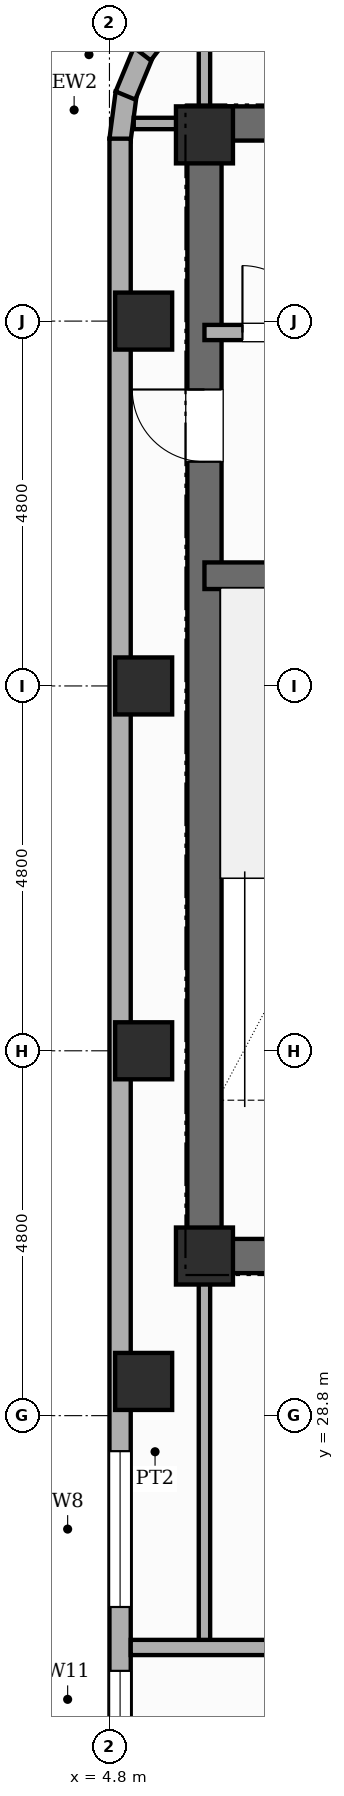
"""IFC4 building model, lengths in metres.
Left out: names, types, materials, properties, quantities, classifications, styles, units other than length and angle.
Written with IfcOpenShell. Run it as: python <this file> out.ifc"""

import sys

from ifc_helpers import new_model, si_unit, direction, frame, frame_2d, origin, origin_2d, place, context, subcontext, project, spatial, rectangle, extrude, element, fill, save


model = new_model("IFC4")
c1 = context("Model", 3, precision=1e-05, world=origin(), true_north=direction((0.0, 1.0)))
c2 = subcontext(c1, "Body", "Model", "MODEL_VIEW")
j1 = project(units=[si_unit("LENGTHUNIT", "METRE"), si_unit("PLANEANGLEUNIT", "RADIAN")], contexts=[c1])
p1 = place(None, origin())
s1 = spatial("IfcSite", under=j1, at=p1, CompositionType="ELEMENT")
p2 = place(p1, origin())
s2 = spatial("IfcBuilding", under=s1, at=p2, CompositionType="ELEMENT")
p3 = place(p2, frame((0.0, 0.0, 278.5)))
s3 = spatial("IfcBuildingStorey", under=s2, at=p3, CompositionType="ELEMENT", Elevation=278.5)
p4 = place(p3, frame((6.05, 30.675, 0.0), z_axis=(0.0, 0.0, 1.0), x_axis=(0.0, 1.0, 0.0)))
e1 = element("IfcWall", 1, at=p4, inside=s3, PredefinedType="SHEAR", context=c2, shape_type="SweptSolid", body=[
    extrude(rectangle(XDim=15.35, YDim=0.45, at=frame_2d((7.675, 0.0))), origin(), (0.0, 0.0, 1.0), 4.3),
])
p5 = place(p4, frame((10.675, 0.0, 0.0)))
e2 = element("IfcOpeningElement", 2, at=p5, cuts=e1, PredefinedType="OPENING", context=c2, shape_type="SweptSolid", body=[
    extrude(rectangle(XDim=0.95, YDim=2.15, at=frame_2d((0.475, 1.075))), frame((0.0, 0.235, 0.0), z_axis=(0.0, -1.0, 0.0), x_axis=(1.0, 0.0, 0.0)), (0.0, 0.0, 1.0), 0.47),
])
p6 = place(p3, frame((6.05, 45.8, 0.0), z_axis=(0.0, 0.0, 1.0), x_axis=(1.0, 0.0, 0.0)))
e3 = element("IfcWall", 3, at=p6, inside=s3, PredefinedType="SHEAR", context=c2, shape_type="SweptSolid", body=[
    extrude(rectangle(XDim=16.7, YDim=0.45, at=frame_2d((8.35, 0.0))), origin(), (0.0, 0.0, 1.0), 4.3),
])
p7 = place(p6, frame((13.57, 0.0, 0.0)))
e4 = element("IfcOpeningElement", 4, at=p7, cuts=e3, PredefinedType="OPENING", context=c2, shape_type="SweptSolid", body=[
    extrude(rectangle(XDim=0.95, YDim=2.15, at=frame_2d((0.475, 1.075))), frame((0.0, 0.235, 0.0), z_axis=(0.0, -1.0, 0.0), x_axis=(1.0, 0.0, 0.0)), (0.0, 0.0, 1.0), 0.47),
])
p8 = place(p3, frame((6.05, 30.9, 0.0), z_axis=(0.0, 0.0, 1.0), x_axis=(1.0, 0.0, 0.0)))
e5 = element("IfcWall", 5, at=p8, inside=s3, PredefinedType="SHEAR", context=c2, shape_type="SweptSolid", body=[
    extrude(rectangle(XDim=3.91, YDim=0.45, at=frame_2d((1.955, 0.0))), origin(), (0.0, 0.0, 1.0), 4.3),
])
p9 = place(p3, frame((6.05, 39.85, 0.0), z_axis=(0.0, 0.0, 1.0), x_axis=(1.0, 0.0, 0.0)))
e6 = element("IfcWall", 6, at=p9, inside=s3, PredefinedType="SHEAR", context=c2, shape_type="SweptSolid", body=[
    extrude(rectangle(XDim=3.91, YDim=0.35, at=frame_2d((1.955, 0.0))), origin(), (0.0, 0.0, 1.0), 4.3),
])
for number, where, z_axis, x_axis in (
    (7, (5.25, 29.25, 0.0), (0.0, 0.0, 1.0), (1.0, 0.0, 0.0)),
    (8, (5.25, 33.6, 0.0), (0.0, 0.0, 1.0), (1.0, 0.0, 0.0)),
    (9, (5.25, 38.4, 0.0), (0.0, 0.0, 1.0), (1.0, 0.0, 0.0)),
    (10, (5.25, 43.2, 0.0), (0.0, 0.0, 1.0), (1.0, 0.0, 0.0)),
    (11, (6.05, 30.9, 0.0), (0.0, 0.0, 1.0), (1.0, 0.0, 0.0)),
    (12, (6.05, 45.65, 0.0), (0.0, 0.0, 1.0), (1.0, 0.0, 0.0)),
):
    element("IfcColumn", number, at=place(p3, frame(where, z_axis=z_axis, x_axis=x_axis)), inside=s3, PredefinedType="COLUMN", context=c2, shape_type="SweptSolid", body=[
        extrude(rectangle(XDim=0.75, YDim=0.75, at=origin_2d()), origin(), (0.0, 0.0, 1.0), 4.3),
    ])
for number, where, z_axis, x_axis in (
    (13, (4.939, 45.582, 0.0), (0.0, 0.0, 1.0), (0.131, 0.991, 0.0)),
    (14, (5.011, 46.167, 0.0), (0.0, 0.0, 1.0), (0.383, 0.924, 0.0)),
    (15, (5.233, 46.715, 0.0), (0.0, 0.0, 1.0), (0.609, 0.793, 0.0)),
):
    element("IfcWall", number, at=place(p3, frame(where, z_axis=z_axis, x_axis=x_axis)), inside=s3, PredefinedType="STANDARD", context=c2, shape_type="SweptSolid", body=[
        extrude(rectangle(XDim=0.626, YDim=0.28, at=frame_2d((0.313, 0.0))), origin(), (0.0, 0.0, 1.0), 4.04),
    ])
p10 = place(p3, frame((4.94, 13.2, 0.0), z_axis=(0.0, 0.0, 1.0), x_axis=(0.0, 1.0, 0.0)))
e16 = element("IfcWall", 16, at=p10, inside=s3, PredefinedType="STANDARD", context=c2, shape_type="SweptSolid", body=[
    extrude(rectangle(XDim=32.4, YDim=0.28, at=frame_2d((16.2, 0.0))), origin(), (0.0, 0.0, 1.0), 3.32),
])
p11 = place(p10, frame((8.1, 0.0, 0.0)))
e17 = element("IfcOpeningElement", 17, at=p11, cuts=e16, PredefinedType="OPENING", context=c2, shape_type="SweptSolid", body=[
    extrude(rectangle(XDim=1.1, YDim=2.15, at=frame_2d((0.55, 1.075))), frame((0.0, 0.15, 0.0), z_axis=(0.0, -1.0, 0.0), x_axis=(1.0, 0.0, 0.0)), (0.0, 0.0, 1.0), 0.3),
])
p12 = place(p10, frame((1.798, 0.0, 0.45)))
e18 = element("IfcOpeningElement", 18, at=p12, cuts=e16, PredefinedType="OPENING", context=c2, shape_type="SweptSolid", body=[
    extrude(rectangle(XDim=0.6, YDim=1.8, at=frame_2d((0.3, 0.9))), frame((0.0, 0.15, 0.0), z_axis=(0.0, -1.0, 0.0), x_axis=(1.0, 0.0, 0.0)), (0.0, 0.0, 1.0), 0.3),
])
p13 = place(p10, frame((3.077, 0.0, 0.8)))
e19 = element("IfcOpeningElement", 19, at=p13, cuts=e16, PredefinedType="OPENING", context=c2, shape_type="SweptSolid", body=[
    extrude(rectangle(XDim=2.05, YDim=1.95, at=frame_2d((1.025, 0.975))), frame((0.0, 0.15, 0.0), z_axis=(0.0, -1.0, 0.0), x_axis=(1.0, 0.0, 0.0)), (0.0, 0.0, 1.0), 0.3),
])
p14 = place(p10, frame((13.083, 0.0, 0.8)))
e20 = element("IfcOpeningElement", 20, at=p14, cuts=e16, PredefinedType="OPENING", context=c2, shape_type="SweptSolid", body=[
    extrude(rectangle(XDim=2.05, YDim=1.95, at=frame_2d((1.025, 0.975))), frame((0.0, 0.15, 0.0), z_axis=(0.0, -1.0, 0.0), x_axis=(1.0, 0.0, 0.0)), (0.0, 0.0, 1.0), 0.3),
])
p15 = place(p10, frame((11.492, 0.0, 0.45)))
e21 = element("IfcOpeningElement", 21, at=p15, cuts=e16, PredefinedType="OPENING", context=c2, shape_type="SweptSolid", body=[
    extrude(rectangle(XDim=0.75, YDim=1.8, at=frame_2d((0.375, 0.9))), frame((0.0, 0.15, 0.0), z_axis=(0.0, -1.0, 0.0), x_axis=(1.0, 0.0, 0.0)), (0.0, 0.0, 1.0), 0.3),
])
p16 = place(p3, frame((6.05, 43.05, 0.0), z_axis=(0.0, 0.0, 1.0), x_axis=(1.0, 0.0, 0.0)))
e22 = element("IfcWall", 22, at=p16, inside=s3, PredefinedType="POLYGONAL", context=c2, shape_type="SweptSolid", body=[
    extrude(rectangle(XDim=3.91, YDim=0.2, at=frame_2d((1.955, 0.0))), origin(), (0.0, 0.0, 1.0), 3.32),
])
p17 = place(p16, frame((0.5, 0.0, 0.0)))
e23 = element("IfcOpeningElement", 23, at=p17, cuts=e22, PredefinedType="OPENING", context=c2, shape_type="SweptSolid", body=[
    extrude(rectangle(XDim=0.88, YDim=2.1, at=frame_2d((0.44, 1.05))), frame((0.0, 0.11, 0.0), z_axis=(0.0, -1.0, 0.0), x_axis=(1.0, 0.0, 0.0)), (0.0, 0.0, 1.0), 0.22),
])
p18 = place(p16, frame((2.35, 0.0, 0.0)))
e24 = element("IfcOpeningElement", 24, at=p18, cuts=e22, PredefinedType="OPENING", context=c2, shape_type="SweptSolid", body=[
    extrude(rectangle(XDim=0.88, YDim=2.1, at=frame_2d((0.44, 1.05))), frame((0.0, 0.11, 0.0), z_axis=(0.0, -1.0, 0.0), x_axis=(1.0, 0.0, 0.0)), (0.0, 0.0, 1.0), 0.22),
])
p19 = place(p3, frame((6.05, 25.75, 0.0), z_axis=(0.0, 0.0, 1.0), x_axis=(0.0, 1.0, 0.0)))
e25 = element("IfcWall", 25, at=p19, inside=s3, PredefinedType="PARTITIONING", context=c2, shape_type="SweptSolid", body=[
    extrude(rectangle(XDim=5.15, YDim=0.15, at=frame_2d((2.575, 0.0))), origin(), (0.0, 0.0, 1.0), 4.04),
])
p20 = place(p3, frame((5.08, 25.75, 0.0), z_axis=(0.0, 0.0, 1.0), x_axis=(1.0, 0.0, 0.0)))
e26 = element("IfcWall", 26, at=p20, inside=s3, PredefinedType="PARTITIONING", context=c2, shape_type="SweptSolid", body=[
    extrude(rectangle(XDim=8.52, YDim=0.2, at=frame_2d((4.26, 0.0))), origin(), (0.0, 0.0, 1.0), 4.04),
])
p21 = place(p3, frame((5.12, 45.8, 0.0), z_axis=(0.0, 0.0, 1.0), x_axis=(1.0, 0.0, 0.0)))
e27 = element("IfcWall", 27, at=p21, inside=s3, PredefinedType="PARTITIONING", context=c2, shape_type="SweptSolid", body=[
    extrude(rectangle(XDim=0.93, YDim=0.15, at=frame_2d((0.465, 0.0))), origin(), (0.0, 0.0, 1.0), 4.04),
])
p22 = place(p3, frame((6.05, 45.8, 0.0), z_axis=(0.0, 0.0, 1.0), x_axis=(0.0, 1.0, 0.0)))
e28 = element("IfcWall", 28, at=p22, inside=s3, PredefinedType="PARTITIONING", context=c2, shape_type="SweptSolid", body=[
    extrude(rectangle(XDim=1.5, YDim=0.15, at=frame_2d((0.75, 0.0))), origin(), (0.0, 0.0, 1.0), 4.04),
])
p23 = place(p14, origin())
e29 = element("IfcWindow", 29, at=p23, inside=s3, PartitioningType="SINGLE_PANEL", PredefinedType="WINDOW", context=c2, shape_type="SweptSolid", body=[
    extrude(rectangle(XDim=2.05, YDim=1.95, at=frame_2d((1.025, 0.975))), frame((0.0, 0.03, 0.0), z_axis=(0.0, -1.0, 0.0), x_axis=(1.0, 0.0, 0.0)), (0.0, 0.0, 1.0), 0.06),
])
fill(e20, e29)
p24 = place(p15, origin())
e30 = element("IfcWindow", 30, at=p24, inside=s3, PartitioningType="SINGLE_PANEL", PredefinedType="WINDOW", context=c2, shape_type="SweptSolid", body=[
    extrude(rectangle(XDim=0.75, YDim=1.8, at=frame_2d((0.375, 0.9))), frame((0.0, 0.03, 0.0), z_axis=(0.0, -1.0, 0.0), x_axis=(1.0, 0.0, 0.0)), (0.0, 0.0, 1.0), 0.06),
])
fill(e21, e30)
p25 = place(p5, origin())
e31 = element("IfcDoor", 31, at=p25, inside=s3, OperationType="SINGLE_SWING_RIGHT", PredefinedType="DOOR", context=c2, shape_type="SweptSolid", body=[
    extrude(rectangle(XDim=0.95, YDim=2.15, at=frame_2d((0.475, 1.075))), frame((0.0, 0.025, 0.0), z_axis=(0.0, -1.0, 0.0), x_axis=(1.0, 0.0, 0.0)), (0.0, 0.0, 1.0), 0.05),
])
fill(e2, e31)
p26 = place(p17, origin())
e32 = element("IfcDoor", 32, at=p26, inside=s3, OperationType="SINGLE_SWING_LEFT", PredefinedType="DOOR", context=c2, shape_type="SweptSolid", body=[
    extrude(rectangle(XDim=0.88, YDim=2.1, at=frame_2d((0.44, 1.05))), frame((0.0, 0.025, 0.0), z_axis=(0.0, -1.0, 0.0), x_axis=(1.0, 0.0, 0.0)), (0.0, 0.0, 1.0), 0.05),
])
fill(e23, e32)
save(model, sys.argv[1])
